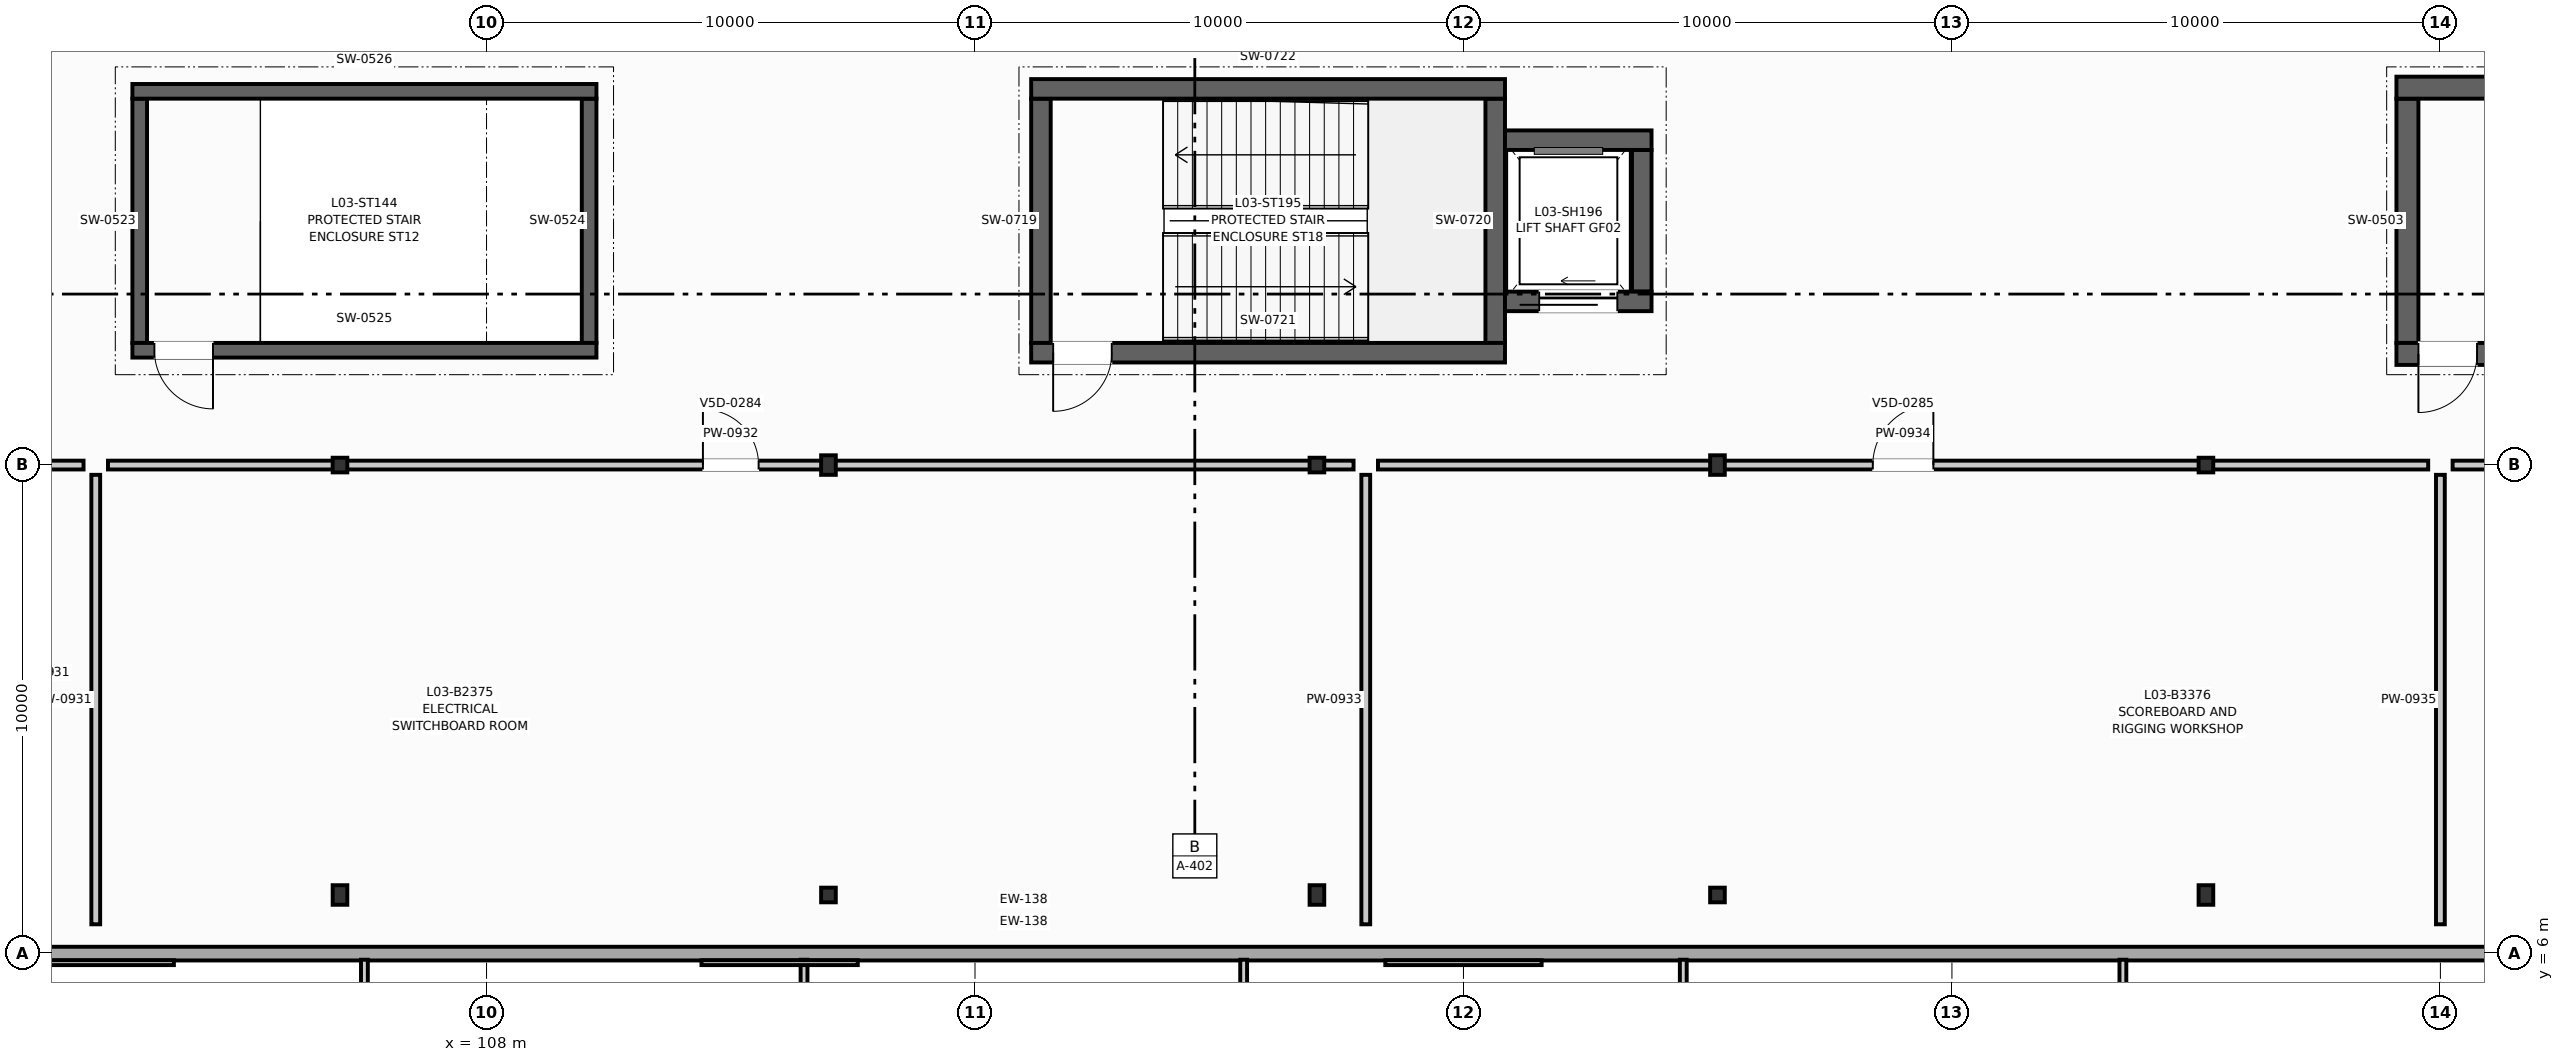
"""IFC4 building model, lengths in metres.
Left out: names, types, materials, properties, quantities, classifications, styles, units other than length and angle.
Written with IfcOpenShell. Run it as: python <this file> out.ifc"""

import sys

from ifc_helpers import new_model, si_unit, direction, frame, frame_2d, origin, origin_2d, place, context, subcontext, project, spatial, rectangle, i_section, extrude, element, fill, save


model = new_model("IFC4")
c1 = context("Model", 3, precision=1e-05, world=origin(), true_north=direction((0.0, 1.0)))
c2 = subcontext(c1, "Body", "Model", "MODEL_VIEW")
j1 = project(units=[si_unit("LENGTHUNIT", "METRE"), si_unit("PLANEANGLEUNIT", "RADIAN")], contexts=[c1])
p1 = place(None, origin())
s1 = spatial("IfcSite", under=j1, at=p1, CompositionType="ELEMENT")
p2 = place(p1, origin())
s2 = spatial("IfcBuilding", under=s1, at=p2, CompositionType="ELEMENT")
p3 = place(p2, frame((0.0, 0.0, 13.5)))
s3 = spatial("IfcBuildingStorey", under=s2, at=p3, CompositionType="ELEMENT", Elevation=13.5)
p4 = place(p3, frame((105.0, 7.2, 0.0), z_axis=(0.0, 0.0, 1.0), x_axis=(1.0, 0.0, 0.0)))
e1 = element("IfcColumn", 1, at=p4, inside=s3, PredefinedType="COLUMN", context=c2, shape_type="SweptSolid", body=[
    extrude(i_section(OverallWidth=0.3, OverallDepth=0.4, WebThickness=0.013, FlangeThickness=0.024, at=origin_2d()), origin(), (0.0, 0.0, 1.0), 4.5),
])
for number, where, z_axis, x_axis in (
    (2, (105.0, 16.0, 0.0), (0.0, 0.0, 1.0), (1.0, 0.0, 0.0)),
    (3, (115.0, 7.2, 0.0), (0.0, 0.0, 1.0), (1.0, 0.0, 0.0)),
):
    element("IfcColumn", number, at=place(p3, frame(where, z_axis=z_axis, x_axis=x_axis)), inside=s3, PredefinedType="COLUMN", context=c2, shape_type="SweptSolid", body=[
        extrude(i_section(OverallWidth=0.3, OverallDepth=0.3, WebThickness=0.011, FlangeThickness=0.019, at=origin_2d()), origin(), (0.0, 0.0, 1.0), 4.5),
    ])
for number, where, z_axis, x_axis in (
    (4, (115.0, 16.0, 0.0), (0.0, 0.0, 1.0), (1.0, 0.0, 0.0)),
    (5, (125.0, 7.2, 0.0), (0.0, 0.0, 1.0), (1.0, 0.0, 0.0)),
):
    element("IfcColumn", number, at=place(p3, frame(where, z_axis=z_axis, x_axis=x_axis)), inside=s3, PredefinedType="COLUMN", context=c2, shape_type="SweptSolid", body=[
        extrude(i_section(OverallWidth=0.3, OverallDepth=0.4, WebThickness=0.013, FlangeThickness=0.024, at=origin_2d()), origin(), (0.0, 0.0, 1.0), 4.5),
    ])
for number, where, z_axis, x_axis in (
    (6, (125.0, 16.0, 0.0), (0.0, 0.0, 1.0), (1.0, 0.0, 0.0)),
    (7, (133.2, 7.2, 0.0), (0.0, 0.0, 1.0), (1.0, 0.0, 0.0)),
):
    element("IfcColumn", number, at=place(p3, frame(where, z_axis=z_axis, x_axis=x_axis)), inside=s3, PredefinedType="COLUMN", context=c2, shape_type="SweptSolid", body=[
        extrude(i_section(OverallWidth=0.3, OverallDepth=0.3, WebThickness=0.011, FlangeThickness=0.019, at=origin_2d()), origin(), (0.0, 0.0, 1.0), 4.5),
    ])
for number, where, z_axis, x_axis in (
    (8, (133.2, 16.0, 0.0), (0.0, 0.0, 1.0), (1.0, 0.0, 0.0)),
    (9, (143.2, 7.2, 0.0), (0.0, 0.0, 1.0), (1.0, 0.0, 0.0)),
):
    element("IfcColumn", number, at=place(p3, frame(where, z_axis=z_axis, x_axis=x_axis)), inside=s3, PredefinedType="COLUMN", context=c2, shape_type="SweptSolid", body=[
        extrude(i_section(OverallWidth=0.3, OverallDepth=0.4, WebThickness=0.013, FlangeThickness=0.024, at=origin_2d()), origin(), (0.0, 0.0, 1.0), 4.5),
    ])
p5 = place(p3, frame((143.2, 16.0, 0.0), z_axis=(0.0, 0.0, 1.0), x_axis=(1.0, 0.0, 0.0)))
e10 = element("IfcColumn", 10, at=p5, inside=s3, PredefinedType="COLUMN", context=c2, shape_type="SweptSolid", body=[
    extrude(i_section(OverallWidth=0.3, OverallDepth=0.3, WebThickness=0.011, FlangeThickness=0.019, at=origin_2d()), origin(), (0.0, 0.0, 1.0), 4.5),
])
p6 = place(p3, frame((74.0, 6.0, 0.0), z_axis=(0.0, 0.0, 1.0), x_axis=(1.0, 0.0, 0.0)))
e11 = element("IfcWall", 11, at=p6, inside=s3, PredefinedType="SOLIDWALL", context=c2, shape_type="SweptSolid", body=[
    extrude(rectangle(XDim=90.0, YDim=0.28, at=frame_2d((45.0, 0.0))), origin(), (0.0, 0.0, 1.0), 3.5),
])
p7 = place(p3, frame((147.325, 18.5, 0.0), z_axis=(0.0, 0.0, 1.0), x_axis=(0.0, 1.0, 0.0)))
e12 = element("IfcWall", 12, at=p7, inside=s3, PredefinedType="SHEAR", context=c2, shape_type="SweptSolid", body=[
    extrude(rectangle(XDim=5.0, YDim=0.45, at=frame_2d((2.5, 0.0))), origin(), (0.0, 0.0, 1.0), 4.25),
])
p8 = place(p3, frame((147.1, 18.275, 0.0), z_axis=(0.0, 0.0, 1.0), x_axis=(1.0, 0.0, 0.0)))
e13 = element("IfcWall", 13, at=p8, inside=s3, PredefinedType="SHEAR", context=c2, shape_type="SweptSolid", body=[
    extrude(rectangle(XDim=9.8, YDim=0.45, at=frame_2d((4.9, 0.0))), origin(), (0.0, 0.0, 1.0), 4.25),
])
p9 = place(p8, frame((0.45, 0.0, 0.0)))
e14 = element("IfcOpeningElement", 14, at=p9, cuts=e13, PredefinedType="OPENING", context=c2, shape_type="SweptSolid", body=[
    extrude(rectangle(XDim=1.2, YDim=2.2, at=frame_2d((0.6, 1.1))), frame((0.0, 0.235, 0.0), z_axis=(0.0, -1.0, 0.0), x_axis=(1.0, 0.0, 0.0)), (0.0, 0.0, 1.0), 0.47),
])
p10 = place(p3, frame((147.1, 23.725, 0.0), z_axis=(0.0, 0.0, 1.0), x_axis=(1.0, 0.0, 0.0)))
e15 = element("IfcWall", 15, at=p10, inside=s3, PredefinedType="SHEAR", context=c2, shape_type="SweptSolid", body=[
    extrude(rectangle(XDim=9.8, YDim=0.45, at=frame_2d((4.9, 0.0))), origin(), (0.0, 0.0, 1.0), 4.25),
])
for number, where, z_axis, x_axis in (
    (16, (100.9, 18.5, 0.0), (0.0, 0.0, 1.0), (0.0, 1.0, 0.0)),
    (17, (110.1, 18.5, 0.0), (0.0, 0.0, 1.0), (0.0, 1.0, 0.0)),
):
    element("IfcWall", number, at=place(p3, frame(where, z_axis=z_axis, x_axis=x_axis)), inside=s3, PredefinedType="SHEAR", context=c2, shape_type="SweptSolid", body=[
        extrude(rectangle(XDim=5.0, YDim=0.3, at=frame_2d((2.5, 0.0))), origin(), (0.0, 0.0, 1.0), 4.25),
    ])
p11 = place(p3, frame((100.75, 18.35, 0.0), z_axis=(0.0, 0.0, 1.0), x_axis=(1.0, 0.0, 0.0)))
e18 = element("IfcWall", 18, at=p11, inside=s3, PredefinedType="SHEAR", context=c2, shape_type="SweptSolid", body=[
    extrude(rectangle(XDim=9.5, YDim=0.3, at=frame_2d((4.75, 0.0))), origin(), (0.0, 0.0, 1.0), 4.25),
])
p12 = place(p11, frame((0.45, 0.0, 0.0)))
e19 = element("IfcOpeningElement", 19, at=p12, cuts=e18, PredefinedType="OPENING", context=c2, shape_type="SweptSolid", body=[
    extrude(rectangle(XDim=1.2, YDim=2.2, at=frame_2d((0.6, 1.1))), frame((0.0, 0.16, 0.0), z_axis=(0.0, -1.0, 0.0), x_axis=(1.0, 0.0, 0.0)), (0.0, 0.0, 1.0), 0.32),
])
p13 = place(p3, frame((100.75, 23.65, 0.0), z_axis=(0.0, 0.0, 1.0), x_axis=(1.0, 0.0, 0.0)))
e20 = element("IfcWall", 20, at=p13, inside=s3, PredefinedType="SHEAR", context=c2, shape_type="SweptSolid", body=[
    extrude(rectangle(XDim=9.5, YDim=0.3, at=frame_2d((4.75, 0.0))), origin(), (0.0, 0.0, 1.0), 4.25),
])
for number, where, z_axis, x_axis in (
    (21, (119.35, 18.5, 0.0), (0.0, 0.0, 1.0), (0.0, 1.0, 0.0)),
    (22, (128.65, 18.5, 0.0), (0.0, 0.0, 1.0), (0.0, 1.0, 0.0)),
):
    element("IfcWall", number, at=place(p3, frame(where, z_axis=z_axis, x_axis=x_axis)), inside=s3, PredefinedType="SHEAR", context=c2, shape_type="SweptSolid", body=[
        extrude(rectangle(XDim=5.0, YDim=0.4, at=frame_2d((2.5, 0.0))), origin(), (0.0, 0.0, 1.0), 4.25),
    ])
p14 = place(p3, frame((119.15, 18.3, 0.0), z_axis=(0.0, 0.0, 1.0), x_axis=(1.0, 0.0, 0.0)))
e23 = element("IfcWall", 23, at=p14, inside=s3, PredefinedType="SHEAR", context=c2, shape_type="SweptSolid", body=[
    extrude(rectangle(XDim=9.7, YDim=0.4, at=frame_2d((4.85, 0.0))), origin(), (0.0, 0.0, 1.0), 4.25),
])
p15 = place(p14, frame((0.45, 0.0, 0.0)))
e24 = element("IfcOpeningElement", 24, at=p15, cuts=e23, PredefinedType="OPENING", context=c2, shape_type="SweptSolid", body=[
    extrude(rectangle(XDim=1.2, YDim=2.2, at=frame_2d((0.6, 1.1))), frame((0.0, 0.21, 0.0), z_axis=(0.0, -1.0, 0.0), x_axis=(1.0, 0.0, 0.0)), (0.0, 0.0, 1.0), 0.42),
])
p16 = place(p3, frame((119.15, 23.7, 0.0), z_axis=(0.0, 0.0, 1.0), x_axis=(1.0, 0.0, 0.0)))
e25 = element("IfcWall", 25, at=p16, inside=s3, PredefinedType="SHEAR", context=c2, shape_type="SweptSolid", body=[
    extrude(rectangle(XDim=9.7, YDim=0.4, at=frame_2d((4.85, 0.0))), origin(), (0.0, 0.0, 1.0), 4.25),
])
p17 = place(p3, frame((131.65, 19.55, 0.0), z_axis=(0.0, 0.0, 1.0), x_axis=(0.0, 1.0, 0.0)))
e26 = element("IfcWall", 26, at=p17, inside=s3, PredefinedType="SHEAR", context=c2, shape_type="SweptSolid", body=[
    extrude(rectangle(XDim=2.9, YDim=0.4, at=frame_2d((1.45, 0.0))), origin(), (0.0, 0.0, 1.0), 4.25),
])
p18 = place(p3, frame((128.85, 19.35, 0.0), z_axis=(0.0, 0.0, 1.0), x_axis=(1.0, 0.0, 0.0)))
e27 = element("IfcWall", 27, at=p18, inside=s3, PredefinedType="SHEAR", context=c2, shape_type="SweptSolid", body=[
    extrude(rectangle(XDim=3.0, YDim=0.4, at=frame_2d((1.5, 0.0))), origin(), (0.0, 0.0, 1.0), 4.25),
])
p19 = place(p18, frame((0.7, 0.0, 0.0)))
e28 = element("IfcOpeningElement", 28, at=p19, cuts=e27, PredefinedType="OPENING", context=c2, shape_type="SweptSolid", body=[
    extrude(rectangle(XDim=1.6, YDim=2.35, at=frame_2d((0.8, 1.175))), frame((0.0, 0.21, 0.0), z_axis=(0.0, -1.0, 0.0), x_axis=(1.0, 0.0, 0.0)), (0.0, 0.0, 1.0), 0.42),
])
p20 = place(p3, frame((128.85, 22.65, 0.0), z_axis=(0.0, 0.0, 1.0), x_axis=(1.0, 0.0, 0.0)))
e29 = element("IfcWall", 29, at=p20, inside=s3, PredefinedType="SHEAR", context=c2, shape_type="SweptSolid", body=[
    extrude(rectangle(XDim=3.0, YDim=0.4, at=frame_2d((1.5, 0.0))), origin(), (0.0, 0.0, 1.0), 4.25),
])
p21 = place(p3, frame((76.05, 16.0, 0.0), z_axis=(0.0, 0.0, 1.0), x_axis=(1.0, 0.0, 0.0)))
e30 = element("IfcWall", 30, at=p21, inside=s3, PredefinedType="PARTITIONING", context=c2, shape_type="SweptSolid", body=[
    extrude(rectangle(XDim=23.7, YDim=0.18, at=frame_2d((11.85, 0.0))), origin(), (0.0, 0.0, 1.0), 3.22),
])
p22 = place(p21, frame((11.36, 0.0, 0.0)))
e31 = element("IfcOpeningElement", 31, at=p22, cuts=e30, PredefinedType="OPENING", context=c2, shape_type="SweptSolid", body=[
    extrude(rectangle(XDim=0.98, YDim=2.15, at=frame_2d((0.49, 1.075))), frame((0.0, 0.1, 0.0), z_axis=(0.0, -1.0, 0.0), x_axis=(1.0, 0.0, 0.0)), (0.0, 0.0, 1.0), 0.2),
])
p23 = place(p3, frame((100.0, 6.6, 0.0), z_axis=(0.0, 0.0, 1.0), x_axis=(0.0, 1.0, 0.0)))
e32 = element("IfcWall", 32, at=p23, inside=s3, PredefinedType="PARTITIONING", context=c2, shape_type="SweptSolid", body=[
    extrude(rectangle(XDim=9.2, YDim=0.18, at=frame_2d((4.6, 0.0))), origin(), (0.0, 0.0, 1.0), 3.22),
])
p24 = place(p3, frame((100.25, 16.0, 0.0), z_axis=(0.0, 0.0, 1.0), x_axis=(1.0, 0.0, 0.0)))
e33 = element("IfcWall", 33, at=p24, inside=s3, PredefinedType="PARTITIONING", context=c2, shape_type="SweptSolid", body=[
    extrude(rectangle(XDim=25.5, YDim=0.18, at=frame_2d((12.75, 0.0))), origin(), (0.0, 0.0, 1.0), 3.22),
])
p25 = place(p24, frame((12.18, 0.0, 0.0)))
e34 = element("IfcOpeningElement", 34, at=p25, cuts=e33, PredefinedType="OPENING", context=c2, shape_type="SweptSolid", body=[
    extrude(rectangle(XDim=1.14, YDim=2.18, at=frame_2d((0.57, 1.09))), frame((0.0, 0.1, 0.0), z_axis=(0.0, -1.0, 0.0), x_axis=(1.0, 0.0, 0.0)), (0.0, 0.0, 1.0), 0.2),
])
p26 = place(p3, frame((126.0, 6.6, 0.0), z_axis=(0.0, 0.0, 1.0), x_axis=(0.0, 1.0, 0.0)))
e35 = element("IfcWall", 35, at=p26, inside=s3, PredefinedType="PARTITIONING", context=c2, shape_type="SweptSolid", body=[
    extrude(rectangle(XDim=9.2, YDim=0.18, at=frame_2d((4.6, 0.0))), origin(), (0.0, 0.0, 1.0), 3.22),
])
p27 = place(p3, frame((126.25, 16.0, 0.0), z_axis=(0.0, 0.0, 1.0), x_axis=(1.0, 0.0, 0.0)))
e36 = element("IfcWall", 36, at=p27, inside=s3, PredefinedType="PARTITIONING", context=c2, shape_type="SweptSolid", body=[
    extrude(rectangle(XDim=21.5, YDim=0.18, at=frame_2d((10.75, 0.0))), origin(), (0.0, 0.0, 1.0), 3.22),
])
p28 = place(p27, frame((10.13, 0.0, 0.0)))
e37 = element("IfcOpeningElement", 37, at=p28, cuts=e36, PredefinedType="OPENING", context=c2, shape_type="SweptSolid", body=[
    extrude(rectangle(XDim=1.24, YDim=2.2, at=frame_2d((0.62, 1.1))), frame((0.0, 0.1, 0.0), z_axis=(0.0, -1.0, 0.0), x_axis=(1.0, 0.0, 0.0)), (0.0, 0.0, 1.0), 0.2),
])
p29 = place(p3, frame((148.0, 6.6, 0.0), z_axis=(0.0, 0.0, 1.0), x_axis=(0.0, 1.0, 0.0)))
e38 = element("IfcWall", 38, at=p29, inside=s3, PredefinedType="PARTITIONING", context=c2, shape_type="SweptSolid", body=[
    extrude(rectangle(XDim=9.2, YDim=0.18, at=frame_2d((4.6, 0.0))), origin(), (0.0, 0.0, 1.0), 3.22),
])
p30 = place(p3, frame((148.25, 16.0, 0.0), z_axis=(0.0, 0.0, 1.0), x_axis=(1.0, 0.0, 0.0)))
e39 = element("IfcWall", 39, at=p30, inside=s3, PredefinedType="PARTITIONING", context=c2, shape_type="SweptSolid", body=[
    extrude(rectangle(XDim=7.5, YDim=0.18, at=frame_2d((3.75, 0.0))), origin(), (0.0, 0.0, 1.0), 3.22),
])
p31 = place(p30, frame((2.21, 0.0, 0.0)))
e40 = element("IfcOpeningElement", 40, at=p31, cuts=e39, PredefinedType="OPENING", context=c2, shape_type="SweptSolid", body=[
    extrude(rectangle(XDim=0.98, YDim=2.15, at=frame_2d((0.49, 1.075))), frame((0.0, 0.1, 0.0), z_axis=(0.0, -1.0, 0.0), x_axis=(1.0, 0.0, 0.0)), (0.0, 0.0, 1.0), 0.2),
])
p32 = place(p9, frame((1.2, 0.0, 0.0), z_axis=(0.0, 0.0, 1.0), x_axis=(-1.0, 0.0, 0.0)))
e41 = element("IfcDoor", 41, at=p32, inside=s3, OperationType="SINGLE_SWING_LEFT", PredefinedType="DOOR", context=c2, shape_type="SweptSolid", body=[
    extrude(rectangle(XDim=1.2, YDim=2.2, at=frame_2d((0.6, 1.1))), frame((0.0, 0.025, 0.0), z_axis=(0.0, -1.0, 0.0), x_axis=(1.0, 0.0, 0.0)), (0.0, 0.0, 1.0), 0.05),
])
fill(e14, e41)
p33 = place(p12, frame((1.2, 0.0, 0.0), z_axis=(0.0, 0.0, 1.0), x_axis=(-1.0, 0.0, 0.0)))
e42 = element("IfcDoor", 42, at=p33, inside=s3, OperationType="SINGLE_SWING_RIGHT", PredefinedType="DOOR", context=c2, shape_type="SweptSolid", body=[
    extrude(rectangle(XDim=1.2, YDim=2.2, at=frame_2d((0.6, 1.1))), frame((0.0, 0.025, 0.0), z_axis=(0.0, -1.0, 0.0), x_axis=(1.0, 0.0, 0.0)), (0.0, 0.0, 1.0), 0.05),
])
fill(e19, e42)
p34 = place(p15, frame((1.2, 0.0, 0.0), z_axis=(0.0, 0.0, 1.0), x_axis=(-1.0, 0.0, 0.0)))
e43 = element("IfcDoor", 43, at=p34, inside=s3, OperationType="SINGLE_SWING_LEFT", PredefinedType="DOOR", context=c2, shape_type="SweptSolid", body=[
    extrude(rectangle(XDim=1.2, YDim=2.2, at=frame_2d((0.6, 1.1))), frame((0.0, 0.025, 0.0), z_axis=(0.0, -1.0, 0.0), x_axis=(1.0, 0.0, 0.0)), (0.0, 0.0, 1.0), 0.05),
])
fill(e24, e43)
p35 = place(p19, origin())
e44 = element("IfcDoor", 44, at=p35, inside=s3, OperationType="SLIDING_TO_LEFT", PredefinedType="DOOR", context=c2, shape_type="SweptSolid", body=[
    extrude(rectangle(XDim=1.6, YDim=2.35, at=frame_2d((0.8, 1.175))), frame((0.0, 0.025, 0.0), z_axis=(0.0, -1.0, 0.0), x_axis=(1.0, 0.0, 0.0)), (0.0, 0.0, 1.0), 0.05),
])
fill(e28, e44)
p36 = place(p25, origin())
e45 = element("IfcDoor", 45, at=p36, inside=s3, OperationType="SINGLE_SWING_LEFT", PredefinedType="DOOR", context=c2, shape_type="SweptSolid", body=[
    extrude(rectangle(XDim=1.14, YDim=2.18, at=frame_2d((0.57, 1.09))), frame((0.0, 0.025, 0.0), z_axis=(0.0, -1.0, 0.0), x_axis=(1.0, 0.0, 0.0)), (0.0, 0.0, 1.0), 0.05),
])
fill(e34, e45)
p37 = place(p28, origin())
e46 = element("IfcDoor", 46, at=p37, inside=s3, OperationType="SINGLE_SWING_RIGHT", PredefinedType="DOOR", context=c2, shape_type="SweptSolid", body=[
    extrude(rectangle(XDim=1.24, YDim=2.2, at=frame_2d((0.62, 1.1))), frame((0.0, 0.025, 0.0), z_axis=(0.0, -1.0, 0.0), x_axis=(1.0, 0.0, 0.0)), (0.0, 0.0, 1.0), 0.05),
])
fill(e37, e46)
save(model, sys.argv[1])
